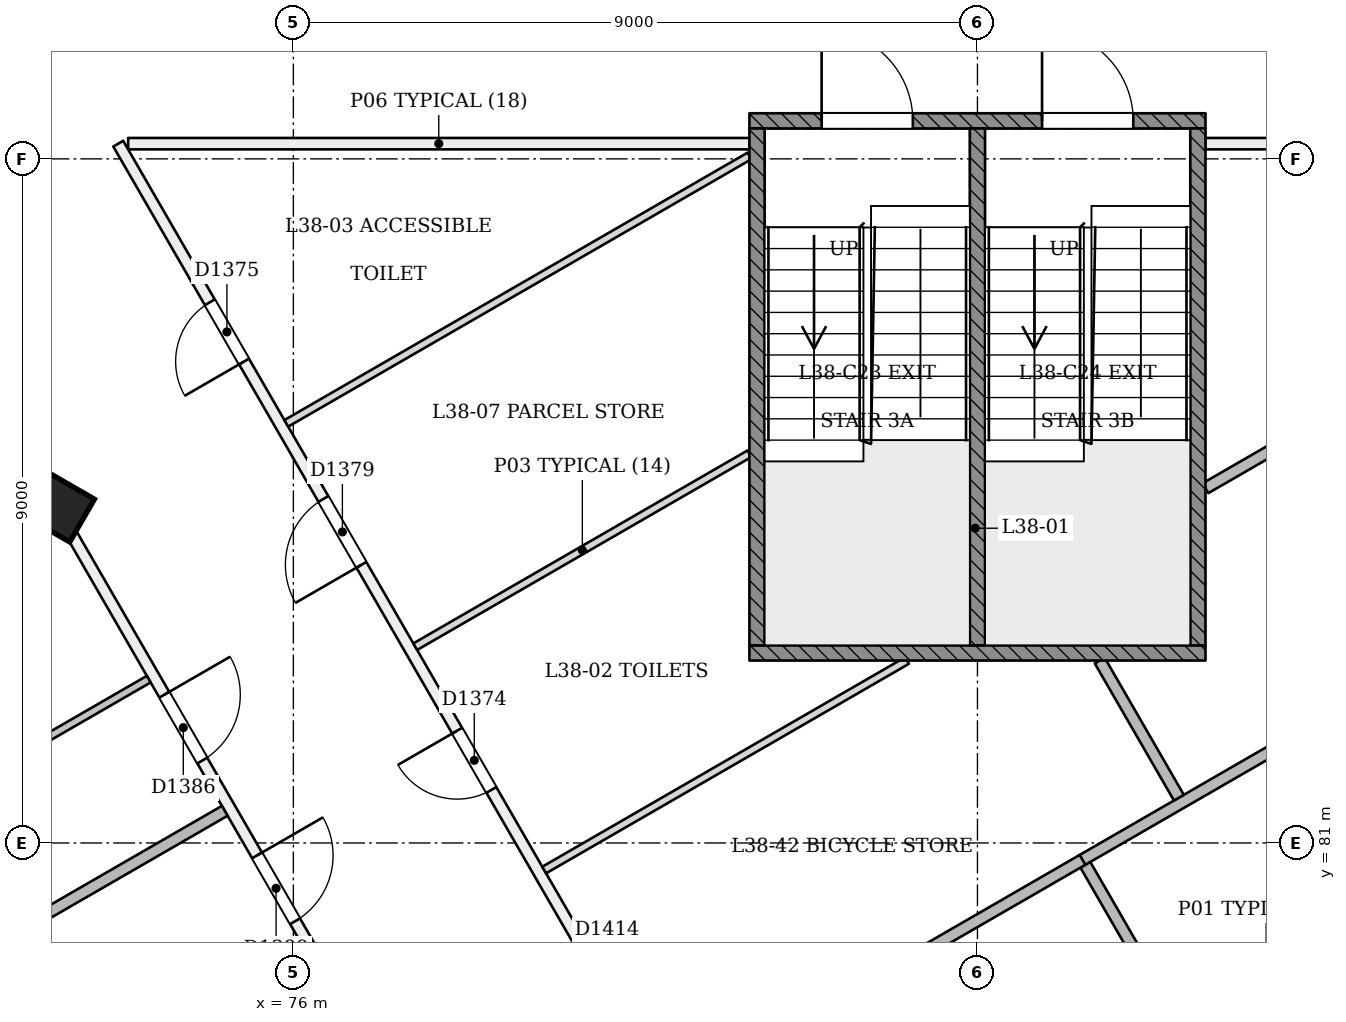
"""IFC4 building model, lengths in metres.
Left out: names, types, materials, properties, quantities, classifications, styles, units other than length and angle.
Written with IfcOpenShell. Run it as: python <this file> out.ifc"""

import sys

from ifc_helpers import new_model, si_unit, direction, frame, frame_2d, origin, origin_2d, place, context, subcontext, project, spatial, rectangle, extrude, element, fill, save


model = new_model("IFC4")
c1 = context("Model", 3, precision=1e-05, world=origin(), true_north=direction((0.0, 1.0)))
c2 = subcontext(c1, "Body", "Model", "MODEL_VIEW")
j1 = project(units=[si_unit("LENGTHUNIT", "METRE"), si_unit("PLANEANGLEUNIT", "RADIAN")], contexts=[c1])
p1 = place(None, origin())
s1 = spatial("IfcSite", under=j1, at=p1, CompositionType="ELEMENT")
p2 = place(p1, origin())
s2 = spatial("IfcBuilding", under=s1, at=p2, CompositionType="ELEMENT")
p3 = place(p2, frame((0.0, 0.0, 149.4)))
s3 = spatial("IfcBuildingStorey", under=s2, at=p3, CompositionType="ELEMENT", Elevation=149.4)
p4 = place(p3, frame((72.912, 85.357, -0.02), z_axis=(0.022222910879, 0.038415824599, 0.999014697916), x_axis=(-0.866022882898, -0.498524966963, 0.038434666793)))
e1 = element("IfcColumn", 1, at=p4, inside=s3, PredefinedType="COLUMN", context=c2, shape_type="SweptSolid", body=[
    extrude(rectangle(XDim=0.65, YDim=0.65, at=origin_2d()), origin(), (0.0, 0.0, 1.0), 3.604),
])
p5 = place(p3, frame((73.826, 90.2, 0.0), z_axis=(0.0, 0.0, 1.0), x_axis=(1.0, 0.0, 0.0)))
e2 = element("IfcWall", 2, at=p5, inside=s3, PredefinedType="PARTITIONING", context=c2, shape_type="SweptSolid", body=[
    extrude(rectangle(XDim=8.174, YDim=0.15, at=frame_2d((4.087, 0.0))), origin(), (0.0, 0.0, 1.0), 3.15),
])
p6 = place(p3, frame((88.0, 90.2, 0.0), z_axis=(0.0, 0.0, 1.0), x_axis=(1.0, 0.0, 0.0)))
e3 = element("IfcWall", 3, at=p6, inside=s3, PredefinedType="PARTITIONING", context=c2, shape_type="SweptSolid", body=[
    extrude(rectangle(XDim=8.174, YDim=0.15, at=frame_2d((4.087, 0.0))), origin(), (0.0, 0.0, 1.0), 3.15),
])
p7 = place(p6, frame((2.116, 0.0, 0.0)))
e4 = element("IfcOpeningElement", 4, at=p7, cuts=e3, PredefinedType="OPENING", context=c2, shape_type="SweptSolid", body=[
    extrude(rectangle(XDim=1.0, YDim=2.1, at=frame_2d((0.5, 1.05))), frame((0.0, 0.085, 0.0), z_axis=(0.0, -1.0, 0.0), x_axis=(1.0, 0.0, 0.0)), (0.0, 0.0, 1.0), 0.171),
])
p8 = place(p3, frame((96.304, 90.2, 0.0), z_axis=(0.0, 0.0, 1.0), x_axis=(-0.500004509943, -0.866022799952, 0.0)))
e5 = element("IfcWall", 5, at=p8, inside=s3, PredefinedType="PARTITIONING", context=c2, shape_type="SweptSolid", body=[
    extrude(rectangle(XDim=22.478, YDim=0.15, at=frame_2d((11.239, 0.0))), origin(), (0.0, 0.0, 1.0), 3.15),
])
p9 = place(p8, frame((10.96, 0.0, 0.0)))
e6 = element("IfcOpeningElement", 6, at=p9, cuts=e5, PredefinedType="OPENING", context=c2, shape_type="SweptSolid", body=[
    extrude(rectangle(XDim=1.0, YDim=2.1, at=frame_2d((0.5, 1.05))), frame((0.0, 0.085, 0.0), z_axis=(0.0, -1.0, 0.0), x_axis=(1.0, 0.0, 0.0)), (0.0, 0.0, 1.0), 0.171),
])
p10 = place(p8, frame((5.447, 0.0, 0.0)))
e7 = element("IfcOpeningElement", 7, at=p10, cuts=e5, PredefinedType="OPENING", context=c2, shape_type="SweptSolid", body=[
    extrude(rectangle(XDim=1.0, YDim=2.1, at=frame_2d((0.5, 1.05))), frame((0.0, 0.085, 0.0), z_axis=(0.0, -1.0, 0.0), x_axis=(1.0, 0.0, 0.0)), (0.0, 0.0, 1.0), 0.171),
])
p11 = place(p3, frame((85.0, 70.621, 0.0), z_axis=(0.0, 0.0, 1.0), x_axis=(-0.500003200507, 0.866023555963, 0.0)))
e8 = element("IfcWall", 8, at=p11, inside=s3, PredefinedType="PARTITIONING", context=c2, shape_type="SweptSolid", body=[
    extrude(rectangle(XDim=22.608, YDim=0.15, at=frame_2d((11.304, 0.0))), origin(), (0.0, 0.0, 1.0), 3.15),
])
p12 = place(p11, frame((12.79, 0.0, 0.0)))
e9 = element("IfcOpeningElement", 9, at=p12, cuts=e8, PredefinedType="OPENING", context=c2, shape_type="SweptSolid", body=[
    extrude(rectangle(XDim=0.9, YDim=2.1, at=frame_2d((0.45, 1.05))), frame((0.0, 0.085, 0.0), z_axis=(0.0, -1.0, 0.0), x_axis=(1.0, 0.0, 0.0)), (0.0, 0.0, 1.0), 0.171),
])
p13 = place(p11, frame((19.298, 0.0, 0.0)))
e10 = element("IfcOpeningElement", 10, at=p13, cuts=e8, PredefinedType="OPENING", context=c2, shape_type="SweptSolid", body=[
    extrude(rectangle(XDim=0.9, YDim=2.1, at=frame_2d((0.45, 1.05))), frame((0.0, 0.085, 0.0), z_axis=(0.0, -1.0, 0.0), x_axis=(1.0, 0.0, 0.0)), (0.0, 0.0, 1.0), 0.171),
])
p14 = place(p11, frame((2.619, 0.0, 0.0)))
e11 = element("IfcOpeningElement", 11, at=p14, cuts=e8, PredefinedType="OPENING", context=c2, shape_type="SweptSolid", body=[
    extrude(rectangle(XDim=1.0, YDim=2.1, at=frame_2d((0.5, 1.05))), frame((0.0, 0.085, 0.0), z_axis=(0.0, -1.0, 0.0), x_axis=(1.0, 0.0, 0.0)), (0.0, 0.0, 1.0), 0.171),
])
p15 = place(p11, frame((16.21, 0.0, 0.0)))
e12 = element("IfcOpeningElement", 12, at=p15, cuts=e8, PredefinedType="OPENING", context=c2, shape_type="SweptSolid", body=[
    extrude(rectangle(XDim=1.0, YDim=2.1, at=frame_2d((0.5, 1.05))), frame((0.0, 0.085, 0.0), z_axis=(0.0, -1.0, 0.0), x_axis=(1.0, 0.0, 0.0)), (0.0, 0.0, 1.0), 0.171),
])
p16 = place(p11, frame((9.246, 0.0, 0.0)))
e13 = element("IfcOpeningElement", 13, at=p16, cuts=e8, PredefinedType="OPENING", context=c2, shape_type="SweptSolid", body=[
    extrude(rectangle(XDim=1.0, YDim=2.1, at=frame_2d((0.5, 1.05))), frame((0.0, 0.085, 0.0), z_axis=(0.0, -1.0, 0.0), x_axis=(1.0, 0.0, 0.0)), (0.0, 0.0, 1.0), 0.171),
])
p17 = place(p11, frame((5.892, 0.0, 0.0)))
e14 = element("IfcOpeningElement", 14, at=p17, cuts=e8, PredefinedType="OPENING", context=c2, shape_type="SweptSolid", body=[
    extrude(rectangle(XDim=1.0, YDim=2.1, at=frame_2d((0.5, 1.05))), frame((0.0, 0.085, 0.0), z_axis=(0.0, -1.0, 0.0), x_axis=(1.0, 0.0, 0.0)), (0.0, 0.0, 1.0), 0.171),
])
p18 = place(p3, frame((65.324, 98.5, 0.0), z_axis=(0.0, 0.0, 1.0), x_axis=(0.500001898363, -0.866024307761, 0.0)))
e15 = element("IfcWall", 15, at=p18, inside=s3, PredefinedType="PARTITIONING", context=c2, shape_type="SweptSolid", body=[
    extrude(rectangle(XDim=39.351, YDim=0.15, at=frame_2d((19.675, 0.0))), origin(), (0.0, 0.0, 1.0), 2.75),
])
p19 = place(p18, frame((0.2, 0.0, 0.0)))
e16 = element("IfcOpeningElement", 16, at=p19, cuts=e15, PredefinedType="OPENING", context=c2, shape_type="SweptSolid", body=[
    extrude(rectangle(XDim=1.2, YDim=2.1, at=frame_2d((0.6, 1.05))), frame((0.0, 0.085, 0.0), z_axis=(0.0, -1.0, 0.0), x_axis=(1.0, 0.0, 0.0)), (0.0, 0.0, 1.0), 0.171),
])
p20 = place(p18, frame((3.425, 0.0, 0.0)))
e17 = element("IfcOpeningElement", 17, at=p20, cuts=e15, PredefinedType="OPENING", context=c2, shape_type="SweptSolid", body=[
    extrude(rectangle(XDim=1.0, YDim=2.1, at=frame_2d((0.5, 1.05))), frame((0.0, 0.085, 0.0), z_axis=(0.0, -1.0, 0.0), x_axis=(1.0, 0.0, 0.0)), (0.0, 0.0, 1.0), 0.171),
])
p21 = place(p18, frame((9.004, 0.0, 0.0)))
e18 = element("IfcOpeningElement", 18, at=p21, cuts=e15, PredefinedType="OPENING", context=c2, shape_type="SweptSolid", body=[
    extrude(rectangle(XDim=1.1, YDim=2.1, at=frame_2d((0.55, 1.05))), frame((0.0, 0.085, 0.0), z_axis=(0.0, -1.0, 0.0), x_axis=(1.0, 0.0, 0.0)), (0.0, 0.0, 1.0), 0.171),
])
p22 = place(p18, frame((11.396, 0.0, 0.0)))
e19 = element("IfcOpeningElement", 19, at=p22, cuts=e15, PredefinedType="OPENING", context=c2, shape_type="SweptSolid", body=[
    extrude(rectangle(XDim=1.0, YDim=2.1, at=frame_2d((0.5, 1.05))), frame((0.0, 0.085, 0.0), z_axis=(0.0, -1.0, 0.0), x_axis=(1.0, 0.0, 0.0)), (0.0, 0.0, 1.0), 0.171),
])
p23 = place(p18, frame((17.955, 0.0, 0.0)))
e20 = element("IfcOpeningElement", 20, at=p23, cuts=e15, PredefinedType="OPENING", context=c2, shape_type="SweptSolid", body=[
    extrude(rectangle(XDim=1.0, YDim=2.1, at=frame_2d((0.5, 1.05))), frame((0.0, 0.085, 0.0), z_axis=(0.0, -1.0, 0.0), x_axis=(1.0, 0.0, 0.0)), (0.0, 0.0, 1.0), 0.171),
])
p24 = place(p18, frame((20.396, 0.0, 0.0)))
e21 = element("IfcOpeningElement", 21, at=p24, cuts=e15, PredefinedType="OPENING", context=c2, shape_type="SweptSolid", body=[
    extrude(rectangle(XDim=1.0, YDim=2.1, at=frame_2d((0.5, 1.05))), frame((0.0, 0.085, 0.0), z_axis=(0.0, -1.0, 0.0), x_axis=(1.0, 0.0, 0.0)), (0.0, 0.0, 1.0), 0.171),
])
p25 = place(p18, frame((26.955, 0.0, 0.0)))
e22 = element("IfcOpeningElement", 22, at=p25, cuts=e15, PredefinedType="OPENING", context=c2, shape_type="SweptSolid", body=[
    extrude(rectangle(XDim=1.0, YDim=2.1, at=frame_2d((0.5, 1.05))), frame((0.0, 0.085, 0.0), z_axis=(0.0, -1.0, 0.0), x_axis=(1.0, 0.0, 0.0)), (0.0, 0.0, 1.0), 0.171),
])
p26 = place(p18, frame((29.396, 0.0, 0.0)))
e23 = element("IfcOpeningElement", 23, at=p26, cuts=e15, PredefinedType="OPENING", context=c2, shape_type="SweptSolid", body=[
    extrude(rectangle(XDim=1.0, YDim=2.1, at=frame_2d((0.5, 1.05))), frame((0.0, 0.085, 0.0), z_axis=(0.0, -1.0, 0.0), x_axis=(1.0, 0.0, 0.0)), (0.0, 0.0, 1.0), 0.171),
])
p27 = place(p18, frame((36.004, 0.0, 0.0)))
e24 = element("IfcOpeningElement", 24, at=p27, cuts=e15, PredefinedType="OPENING", context=c2, shape_type="SweptSolid", body=[
    extrude(rectangle(XDim=1.1, YDim=2.1, at=frame_2d((0.55, 1.05))), frame((0.0, 0.085, 0.0), z_axis=(0.0, -1.0, 0.0), x_axis=(1.0, 0.0, 0.0)), (0.0, 0.0, 1.0), 0.171),
])
p28 = place(p3, frame((85.065, 64.534, 0.0), z_axis=(0.0, 0.0, 1.0), x_axis=(0.500002644497, 0.866023876978, 0.0)))
e25 = element("IfcWall", 25, at=p28, inside=s3, PredefinedType="PARTITIONING", context=c2, shape_type="SweptSolid", body=[
    extrude(rectangle(XDim=39.221, YDim=0.15, at=frame_2d((19.61, 0.0))), origin(), (0.0, 0.0, 1.0), 2.75),
])
p29 = place(p28, frame((0.506, 0.0, 0.0)))
e26 = element("IfcOpeningElement", 26, at=p29, cuts=e25, PredefinedType="OPENING", context=c2, shape_type="SweptSolid", body=[
    extrude(rectangle(XDim=1.2, YDim=2.1, at=frame_2d((0.6, 1.05))), frame((0.0, 0.085, 0.0), z_axis=(0.0, -1.0, 0.0), x_axis=(1.0, 0.0, 0.0)), (0.0, 0.0, 1.0), 0.171),
])
p30 = place(p28, frame((8.825, 0.0, 0.0)))
e27 = element("IfcOpeningElement", 27, at=p30, cuts=e25, PredefinedType="OPENING", context=c2, shape_type="SweptSolid", body=[
    extrude(rectangle(XDim=1.0, YDim=2.1, at=frame_2d((0.5, 1.05))), frame((0.0, 0.085, 0.0), z_axis=(0.0, -1.0, 0.0), x_axis=(1.0, 0.0, 0.0)), (0.0, 0.0, 1.0), 0.171),
])
p31 = place(p28, frame((11.266, 0.0, 0.0)))
e28 = element("IfcOpeningElement", 28, at=p31, cuts=e25, PredefinedType="OPENING", context=c2, shape_type="SweptSolid", body=[
    extrude(rectangle(XDim=1.0, YDim=2.1, at=frame_2d((0.5, 1.05))), frame((0.0, 0.085, 0.0), z_axis=(0.0, -1.0, 0.0), x_axis=(1.0, 0.0, 0.0)), (0.0, 0.0, 1.0), 0.171),
])
p32 = place(p28, frame((17.825, 0.0, 0.0)))
e29 = element("IfcOpeningElement", 29, at=p32, cuts=e25, PredefinedType="OPENING", context=c2, shape_type="SweptSolid", body=[
    extrude(rectangle(XDim=1.0, YDim=2.1, at=frame_2d((0.5, 1.05))), frame((0.0, 0.085, 0.0), z_axis=(0.0, -1.0, 0.0), x_axis=(1.0, 0.0, 0.0)), (0.0, 0.0, 1.0), 0.171),
])
p33 = place(p28, frame((20.266, 0.0, 0.0)))
e30 = element("IfcOpeningElement", 30, at=p33, cuts=e25, PredefinedType="OPENING", context=c2, shape_type="SweptSolid", body=[
    extrude(rectangle(XDim=1.0, YDim=2.1, at=frame_2d((0.5, 1.05))), frame((0.0, 0.085, 0.0), z_axis=(0.0, -1.0, 0.0), x_axis=(1.0, 0.0, 0.0)), (0.0, 0.0, 1.0), 0.171),
])
p34 = place(p28, frame((26.825, 0.0, 0.0)))
e31 = element("IfcOpeningElement", 31, at=p34, cuts=e25, PredefinedType="OPENING", context=c2, shape_type="SweptSolid", body=[
    extrude(rectangle(XDim=1.0, YDim=2.1, at=frame_2d((0.5, 1.05))), frame((0.0, 0.085, 0.0), z_axis=(0.0, -1.0, 0.0), x_axis=(1.0, 0.0, 0.0)), (0.0, 0.0, 1.0), 0.171),
])
p35 = place(p28, frame((30.296, 0.0, 0.0)))
e32 = element("IfcOpeningElement", 32, at=p35, cuts=e25, PredefinedType="OPENING", context=c2, shape_type="SweptSolid", body=[
    extrude(rectangle(XDim=1.0, YDim=2.1, at=frame_2d((0.5, 1.05))), frame((0.0, 0.085, 0.0), z_axis=(0.0, -1.0, 0.0), x_axis=(1.0, 0.0, 0.0)), (0.0, 0.0, 1.0), 0.171),
])
p36 = place(p28, frame((35.875, 0.0, 0.0)))
e33 = element("IfcOpeningElement", 33, at=p36, cuts=e25, PredefinedType="OPENING", context=c2, shape_type="SweptSolid", body=[
    extrude(rectangle(XDim=1.1, YDim=2.1, at=frame_2d((0.55, 1.05))), frame((0.0, 0.085, 0.0), z_axis=(0.0, -1.0, 0.0), x_axis=(1.0, 0.0, 0.0)), (0.0, 0.0, 1.0), 0.171),
])
p37 = place(p28, frame((37.821, 0.0, 0.0)))
e34 = element("IfcOpeningElement", 34, at=p37, cuts=e25, PredefinedType="OPENING", context=c2, shape_type="SweptSolid", body=[
    extrude(rectangle(XDim=1.2, YDim=2.1, at=frame_2d((0.6, 1.05))), frame((0.0, 0.085, 0.0), z_axis=(0.0, -1.0, 0.0), x_axis=(1.0, 0.0, 0.0)), (0.0, 0.0, 1.0), 0.171),
])
p38 = place(p3, frame((82.0, 86.121, 0.0), z_axis=(0.0, 0.0, 1.0), x_axis=(-0.866023813814, -0.5000027539, 0.0)))
e35 = element("IfcWall", 35, at=p38, inside=s3, PredefinedType="PARTITIONING", context=c2, shape_type="SweptSolid", body=[
    extrude(rectangle(XDim=5.077, YDim=0.1, at=frame_2d((2.538, 0.0))), origin(), (0.0, 0.0, 1.0), 3.15),
])
p39 = place(p3, frame((79.3, 80.644, 0.0), z_axis=(0.0, 0.0, 1.0), x_axis=(0.866032163869, 0.499988291006, 0.0)))
e36 = element("IfcWall", 36, at=p39, inside=s3, PredefinedType="PARTITIONING", context=c2, shape_type="SweptSolid", body=[
    extrude(rectangle(XDim=5.512, YDim=0.1, at=frame_2d((2.756, 0.0))), origin(), (0.0, 0.0, 1.0), 3.15),
])
p40 = place(p3, frame((75.907, 86.521, 0.0), z_axis=(0.0, 0.0, 1.0), x_axis=(0.866030712881, 0.499990804263, 0.0)))
e37 = element("IfcWall", 37, at=p40, inside=s3, PredefinedType="PARTITIONING", context=c2, shape_type="SweptSolid", body=[
    extrude(rectangle(XDim=7.035, YDim=0.1, at=frame_2d((3.518, 0.0))), origin(), (0.0, 0.0, 1.0), 3.15),
])
p41 = place(p3, frame((92.862, 84.519, 0.0), z_axis=(0.0, 0.0, 1.0), x_axis=(-0.866023543838, -0.500003221507, 0.0)))
e38 = element("IfcWall", 38, at=p41, inside=s3, PredefinedType="PARTITIONING", context=c2, shape_type="SweptSolid", body=[
    extrude(rectangle(XDim=7.502, YDim=0.15, at=frame_2d((3.751, 0.0))), origin(), (0.0, 0.0, 1.0), 3.15),
])
p42 = place(p3, frame((86.42, 80.713, 0.0), z_axis=(0.0, 0.0, 1.0), x_axis=(0.500010613097, -0.866019276224, 0.0)))
e39 = element("IfcWall", 39, at=p42, inside=s3, PredefinedType="PARTITIONING", context=c2, shape_type="SweptSolid", body=[
    extrude(rectangle(XDim=3.276, YDim=0.15, at=frame_2d((1.638, 0.0))), origin(), (0.0, 0.0, 1.0), 3.15),
])
p43 = place(p3, frame((88.0, 85.667, 0.0), z_axis=(0.0, 0.0, 1.0), x_axis=(0.86602686142, 0.499997475293, 0.0)))
e40 = element("IfcWall", 40, at=p43, inside=s3, PredefinedType="PARTITIONING", context=c2, shape_type="SweptSolid", body=[
    extrude(rectangle(XDim=8.786, YDim=0.15, at=frame_2d((4.393, 0.0))), origin(), (0.0, 0.0, 1.0), 3.15),
])
p44 = place(p3, frame((70.444, 83.933, 0.0), z_axis=(0.0, 0.0, 1.0), x_axis=(0.866042014628, 0.499971228071, 0.0)))
e41 = element("IfcWall", 41, at=p44, inside=s3, PredefinedType="PARTITIONING", context=c2, shape_type="SweptSolid", body=[
    extrude(rectangle(XDim=2.775, YDim=0.1, at=frame_2d((1.388, 0.0))), origin(), (0.0, 0.0, 1.0), 2.75),
])
p45 = place(p3, frame((74.097, 83.155, 0.0), z_axis=(0.0, 0.0, 1.0), x_axis=(-0.866048868473, -0.499959355765, 0.0)))
e42 = element("IfcWall", 42, at=p45, inside=s3, PredefinedType="PARTITIONING", context=c2, shape_type="SweptSolid", body=[
    extrude(rectangle(XDim=2.825, YDim=0.1, at=frame_2d((1.413, 0.0))), origin(), (0.0, 0.0, 1.0), 3.15),
])
p46 = place(p3, frame((69.602, 78.25, 0.0), z_axis=(0.0, 0.0, 1.0), x_axis=(0.866025401434, 0.500000004071, 0.0)))
e43 = element("IfcWall", 43, at=p46, inside=s3, PredefinedType="PARTITIONING", context=c2, shape_type="SweptSolid", body=[
    extrude(rectangle(XDim=6.345, YDim=0.15, at=frame_2d((3.173, 0.0))), origin(), (0.0, 0.0, 1.0), 2.65),
])
p47 = place(p3, frame((73.651, 78.279, 0.0), z_axis=(0.0, 0.0, 1.0), x_axis=(0.866048868473, 0.499959355765, 0.0)))
e44 = element("IfcWall", 44, at=p47, inside=s3, PredefinedType="PARTITIONING", context=c2, shape_type="SweptSolid", body=[
    extrude(rectangle(XDim=2.825, YDim=0.1, at=frame_2d((1.413, 0.0))), origin(), (0.0, 0.0, 1.0), 3.15),
])
p48 = place(p3, frame((86.609, 83.4, 0.0), z_axis=(0.0, 0.0, 1.0), x_axis=(0.499996383721, -0.866027491634, 0.0)))
e45 = element("IfcWall", 45, at=p48, inside=s3, PredefinedType="PARTITIONING", context=c2, shape_type="SweptSolid", body=[
    extrude(rectangle(XDim=2.083, YDim=0.15, at=frame_2d((1.042, 0.0))), origin(), (0.0, 0.0, 1.0), 3.15),
])
p49 = place(p3, frame((81.013, 77.677, 0.0), z_axis=(0.0, 0.0, 1.0), x_axis=(0.866022320763, 0.500005339912, 0.0)))
e46 = element("IfcWall", 46, at=p49, inside=s3, PredefinedType="PARTITIONING", context=c2, shape_type="SweptSolid", body=[
    extrude(rectangle(XDim=6.201, YDim=0.15, at=frame_2d((3.1, 0.0))), origin(), (0.0, 0.0, 1.0), 3.15),
])
p50 = place(p3, frame((82.0, 90.5, 0.0), z_axis=(0.0, 0.0, 1.0), x_axis=(1.0, 0.0, 0.0)))
e47 = element("IfcWall", 47, at=p50, inside=s3, PredefinedType="SOLIDWALL", context=c2, shape_type="SweptSolid", body=[
    extrude(rectangle(XDim=6.0, YDim=0.2, at=frame_2d((3.0, 0.0))), origin(), (0.0, 0.0, 1.0), 3.15),
])
p51 = place(p50, frame((0.95, 0.0, 0.0)))
e48 = element("IfcOpeningElement", 48, at=p51, cuts=e47, PredefinedType="OPENING", context=c2, shape_type="SweptSolid", body=[
    extrude(rectangle(XDim=1.2, YDim=2.1, at=frame_2d((0.6, 1.05))), frame((0.0, 0.11, 0.0), z_axis=(0.0, -1.0, 0.0), x_axis=(1.0, 0.0, 0.0)), (0.0, 0.0, 1.0), 0.221),
])
p52 = place(p50, frame((3.85, 0.0, 0.0)))
e49 = element("IfcOpeningElement", 49, at=p52, cuts=e47, PredefinedType="OPENING", context=c2, shape_type="SweptSolid", body=[
    extrude(rectangle(XDim=1.2, YDim=2.1, at=frame_2d((0.6, 1.05))), frame((0.0, 0.11, 0.0), z_axis=(0.0, -1.0, 0.0), x_axis=(1.0, 0.0, 0.0)), (0.0, 0.0, 1.0), 0.221),
])
p53 = place(p3, frame((82.0, 83.5, 0.0), z_axis=(0.0, 0.0, 1.0), x_axis=(1.0, 0.0, 0.0)))
e50 = element("IfcWall", 50, at=p53, inside=s3, PredefinedType="SOLIDWALL", context=c2, shape_type="SweptSolid", body=[
    extrude(rectangle(XDim=6.0, YDim=0.2, at=frame_2d((3.0, 0.0))), origin(), (0.0, 0.0, 1.0), 3.15),
])
for number, where, z_axis, x_axis in (
    (51, (82.1, 83.6, 0.0), (0.0, 0.0, 1.0), (0.0, 1.0, 0.0)),
    (52, (87.9, 83.6, 0.0), (0.0, 0.0, 1.0), (0.0, 1.0, 0.0)),
    (53, (85.0, 83.6, 0.0), (0.0, 0.0, 1.0), (0.0, 1.0, 0.0)),
):
    element("IfcWall", number, at=place(p3, frame(where, z_axis=z_axis, x_axis=x_axis)), inside=s3, PredefinedType="SOLIDWALL", context=c2, shape_type="SweptSolid", body=[
        extrude(rectangle(XDim=6.8, YDim=0.2, at=frame_2d((3.4, 0.0))), origin(), (0.0, 0.0, 1.0), 3.15),
    ])
p54 = place(p12, origin())
e54 = element("IfcDoor", 54, at=p54, inside=s3, OperationType="SINGLE_SWING_RIGHT", PredefinedType="NOTDEFINED", context=c2, shape_type="SweptSolid", body=[
    extrude(rectangle(XDim=0.9, YDim=2.1, at=frame_2d((0.45, 1.05))), frame((0.0, 0.025, 0.0), z_axis=(0.0, -1.0, 0.0), x_axis=(1.0, 0.0, 0.0)), (0.0, 0.0, 1.0), 0.05),
])
fill(e9, e54)
p55 = place(p13, origin())
e55 = element("IfcDoor", 55, at=p55, inside=s3, OperationType="SINGLE_SWING_LEFT", PredefinedType="NOTDEFINED", context=c2, shape_type="SweptSolid", body=[
    extrude(rectangle(XDim=0.9, YDim=2.1, at=frame_2d((0.45, 1.05))), frame((0.0, 0.025, 0.0), z_axis=(0.0, -1.0, 0.0), x_axis=(1.0, 0.0, 0.0)), (0.0, 0.0, 1.0), 0.05),
])
fill(e10, e55)
p56 = place(p15, origin())
e56 = element("IfcDoor", 56, at=p56, inside=s3, OperationType="SINGLE_SWING_LEFT", PredefinedType="NOTDEFINED", context=c2, shape_type="SweptSolid", body=[
    extrude(rectangle(XDim=1.0, YDim=2.1, at=frame_2d((0.5, 1.05))), frame((0.0, 0.025, 0.0), z_axis=(0.0, -1.0, 0.0), x_axis=(1.0, 0.0, 0.0)), (0.0, 0.0, 1.0), 0.05),
])
fill(e12, e56)
p57 = place(p23, origin())
e57 = element("IfcDoor", 57, at=p57, inside=s3, OperationType="SINGLE_SWING_LEFT", PredefinedType="NOTDEFINED", context=c2, shape_type="SweptSolid", body=[
    extrude(rectangle(XDim=1.0, YDim=2.1, at=frame_2d((0.5, 1.05))), frame((0.0, 0.025, 0.0), z_axis=(0.0, -1.0, 0.0), x_axis=(1.0, 0.0, 0.0)), (0.0, 0.0, 1.0), 0.05),
])
fill(e20, e57)
p58 = place(p24, origin())
e58 = element("IfcDoor", 58, at=p58, inside=s3, OperationType="SINGLE_SWING_LEFT", PredefinedType="NOTDEFINED", context=c2, shape_type="SweptSolid", body=[
    extrude(rectangle(XDim=1.0, YDim=2.1, at=frame_2d((0.5, 1.05))), frame((0.0, 0.025, 0.0), z_axis=(0.0, -1.0, 0.0), x_axis=(1.0, 0.0, 0.0)), (0.0, 0.0, 1.0), 0.05),
])
fill(e21, e58)
p59 = place(p51, origin())
e59 = element("IfcDoor", 59, at=p59, inside=s3, OperationType="SINGLE_SWING_LEFT", PredefinedType="NOTDEFINED", context=c2, shape_type="SweptSolid", body=[
    extrude(rectangle(XDim=1.2, YDim=2.1, at=frame_2d((0.6, 1.05))), frame((0.0, 0.025, 0.0), z_axis=(0.0, -1.0, 0.0), x_axis=(1.0, 0.0, 0.0)), (0.0, 0.0, 1.0), 0.05),
])
fill(e48, e59)
p60 = place(p52, origin())
e60 = element("IfcDoor", 60, at=p60, inside=s3, OperationType="SINGLE_SWING_LEFT", PredefinedType="NOTDEFINED", context=c2, shape_type="SweptSolid", body=[
    extrude(rectangle(XDim=1.2, YDim=2.1, at=frame_2d((0.6, 1.05))), frame((0.0, 0.025, 0.0), z_axis=(0.0, -1.0, 0.0), x_axis=(1.0, 0.0, 0.0)), (0.0, 0.0, 1.0), 0.05),
])
fill(e49, e60)
save(model, sys.argv[1])
